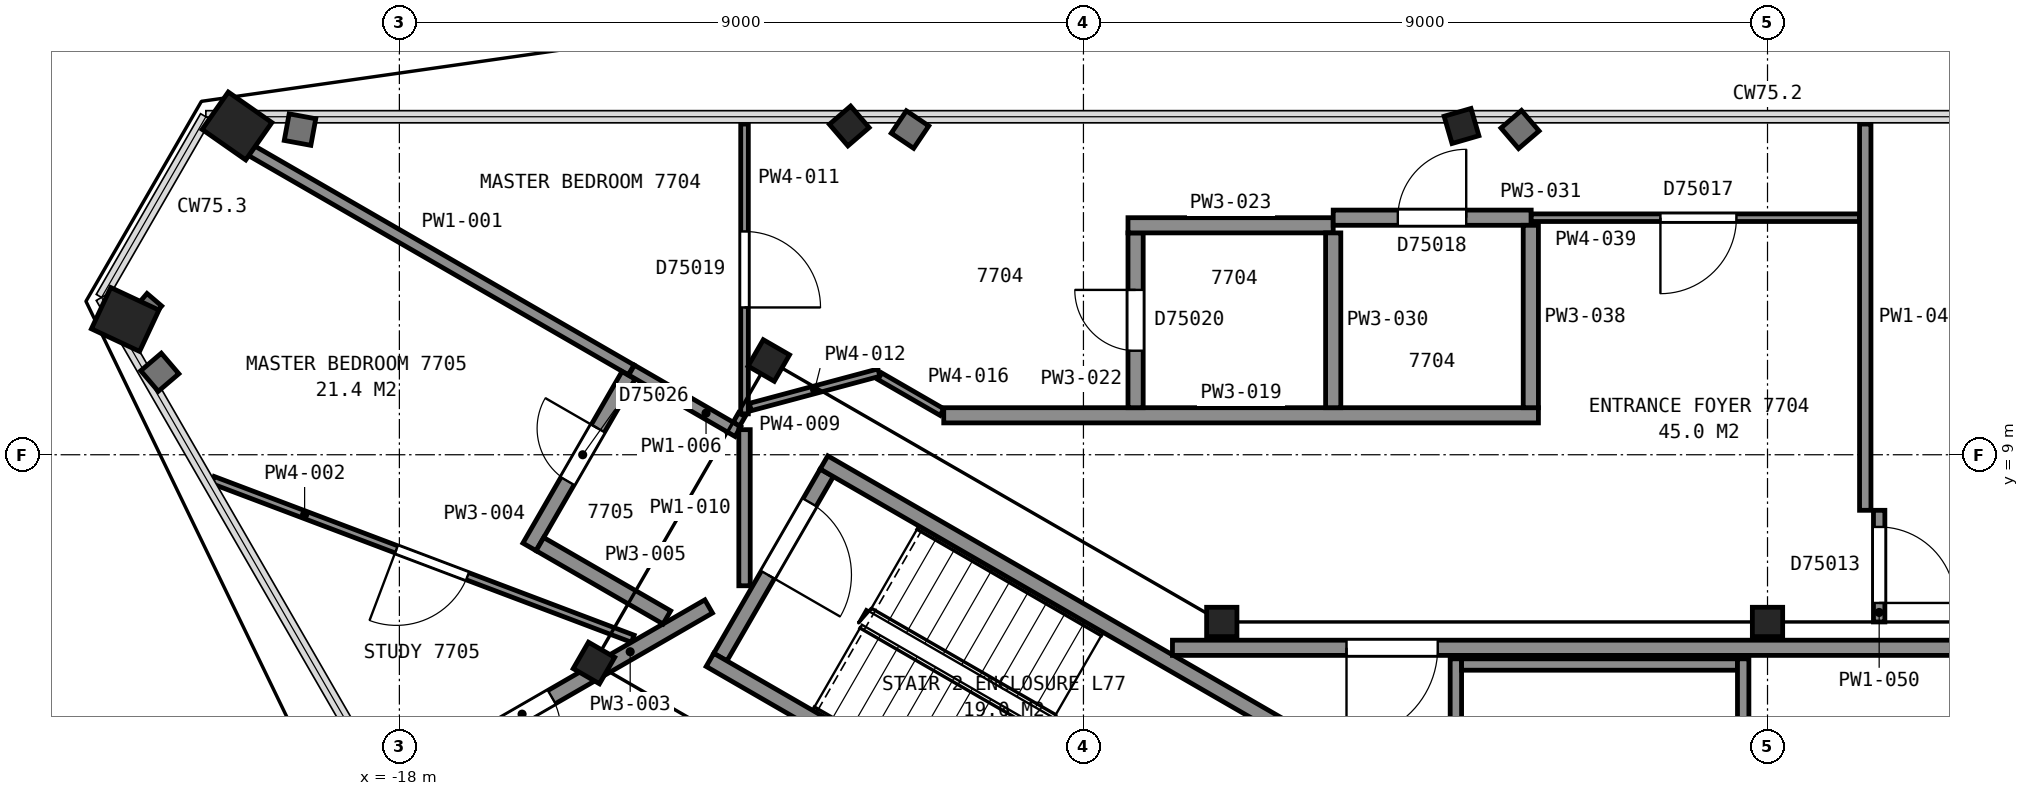
"""IFC4 building model, lengths in metres.
Left out: names, types, materials, properties, quantities, classifications, styles, units other than length and angle.
Written with IfcOpenShell. Run it as: python <this file> out.ifc"""

import sys

from ifc_helpers import new_model, si_unit, direction, frame, frame_2d, origin, origin_2d, place, context, subcontext, project, spatial, rectangle, hollow_rectangle, i_section, extrude, element, fill, save


model = new_model("IFC4")
c1 = context("Model", 3, precision=1e-05, world=origin(), true_north=direction((0.0, 1.0)))
c2 = subcontext(c1, "Body", "Model", "MODEL_VIEW")
j1 = project(units=[si_unit("LENGTHUNIT", "METRE"), si_unit("PLANEANGLEUNIT", "RADIAN")], contexts=[c1])
p1 = place(None, origin())
s1 = spatial("IfcSite", under=j1, at=p1, CompositionType="ELEMENT")
p2 = place(p1, origin())
s2 = spatial("IfcBuilding", under=s1, at=p2, CompositionType="ELEMENT")
p3 = place(p2, frame((0.0, 0.0, 304.7)))
s3 = spatial("IfcBuildingStorey", under=s2, at=p3, CompositionType="ELEMENT", Elevation=304.7)
p4 = place(p3, frame((-4.116, 13.638, 0.045), z_axis=(0.075454530978, -0.260152118886, 0.962614922383), x_axis=(0.996942757007, 3.6761517e-05, -0.078135381871)))
e1 = element("IfcColumn", 1, at=p4, inside=s3, PredefinedType="COLUMN", context=c2, shape_type="SweptSolid", body=[
    extrude(i_section(OverallWidth=0.373, OverallDepth=0.368, WebThickness=0.015, FlangeThickness=0.024, FilletRadius=0.015, at=origin_2d()), origin(), (0.0, 0.0, 1.0), 3.75),
])
p5 = place(p3, frame((-12.347, 13.635, 0.055), z_axis=(0.218944088069, -0.254559334695, 0.94194640581), x_axis=(0.974036747124, 4.8635043e-05, -0.226389957566)))
e2 = element("IfcColumn", 2, at=p5, inside=s3, PredefinedType="COLUMN", context=c2, shape_type="SweptSolid", body=[
    extrude(i_section(OverallWidth=0.373, OverallDepth=0.368, WebThickness=0.015, FlangeThickness=0.024, FilletRadius=0.015, at=origin_2d()), origin(), (0.0, 0.0, 1.0), 3.811),
])
p6 = place(p3, frame((-20.565, 13.626, 0.09), z_axis=(0.349540963312, -0.244465386581, 0.904465471829), x_axis=(0.499636006059, 0.86527489038, 0.040782662093)))
e3 = element("IfcColumn", 3, at=p6, inside=s3, PredefinedType="COLUMN", context=c2, shape_type="SweptSolid", body=[
    extrude(hollow_rectangle(XDim=0.6, YDim=0.7, WallThickness=0.04, at=origin_2d()), origin(), (0.0, 0.0, 1.0), 3.892),
])
p7 = place(p3, frame((-22.082, 11.002, 0.09), z_axis=(0.386249226446, -0.1808602436, 0.904489418045), x_axis=(0.499519388937, 0.865365975723, -0.040275403639)))
e4 = element("IfcColumn", 4, at=p7, inside=s3, PredefinedType="COLUMN", context=c2, shape_type="SweptSolid", body=[
    extrude(hollow_rectangle(XDim=0.6, YDim=0.7, WallThickness=0.04, at=origin_2d()), origin(), (0.0, 0.0, 1.0), 3.892),
])
for number, where, z_axis, x_axis in (
    (5, (0.0, 6.8, 0.0), (0.0, 0.0, 1.0), (1.0, 0.0, 0.0)),
    (6, (-7.18, 6.8, 0.0), (0.0, 0.0, 1.0), (1.0, 0.0, 0.0)),
):
    element("IfcColumn", number, at=place(p3, frame(where, z_axis=z_axis, x_axis=x_axis)), inside=s3, PredefinedType="COLUMN", context=c2, shape_type="SweptSolid", body=[
        extrude(i_section(OverallWidth=0.399, OverallDepth=0.386, WebThickness=0.021, FlangeThickness=0.033, FilletRadius=0.015, at=origin_2d()), origin(), (0.0, 0.0, 1.0), 3.7),
    ])
for number, where, z_axis, x_axis in (
    (7, (-13.14, 10.24, 0.0), (0.0, 0.0, 1.0), (0.5, 0.866, 0.0)),
    (8, (-15.44, 6.26, 0.0), (0.0, 0.0, 1.0), (0.5, 0.866, 0.0)),
):
    element("IfcColumn", number, at=place(p3, frame(where, z_axis=z_axis, x_axis=x_axis)), inside=s3, PredefinedType="COLUMN", context=c2, shape_type="SweptSolid", body=[
        extrude(i_section(OverallWidth=0.401, OverallDepth=0.399, WebThickness=0.025, FlangeThickness=0.04, FilletRadius=0.015, at=origin_2d()), origin(), (0.0, 0.0, 1.0), 3.7),
    ])
p8 = place(p3, frame((-12.377, 8.762, 0.0), z_axis=(0.0, 0.0, 1.0), x_axis=(-0.500049511043, -0.865996816683, 0.0)))
e9 = element("IfcWall", 9, at=p8, inside=s3, PredefinedType="PARTITIONING", context=c2, shape_type="SweptSolid", body=[
    extrude(rectangle(XDim=2.8, YDim=0.2, at=frame_2d((1.4, 0.0))), origin(), (0.0, 0.0, 1.0), 3.45),
])
p9 = place(p8, frame((0.45, 0.0, 0.0)))
e10 = element("IfcOpeningElement", 10, at=p9, cuts=e9, PredefinedType="OPENING", context=c2, shape_type="SweptSolid", body=[
    extrude(rectangle(XDim=1.1, YDim=2.1, at=frame_2d((0.55, 1.05))), frame((0.0, 0.11, 0.0), z_axis=(0.0, -1.0, 0.0), x_axis=(1.0, 0.0, 0.0)), (0.0, 0.0, 1.0), 0.22),
])
for number, where, z_axis, x_axis in (
    (11, (-7.678, 2.701, 0.0), (0.0, 0.0, 1.0), (-0.866, 0.5, 0.0)),
    (12, (-6.178, 5.299, 0.0), (0.0, 0.0, 1.0), (-0.866, 0.5, 0.0)),
):
    element("IfcWall", number, at=place(p3, frame(where, z_axis=z_axis, x_axis=x_axis)), inside=s3, PredefinedType="PARTITIONING", context=c2, shape_type="SweptSolid", body=[
        extrude(rectangle(XDim=7.2, YDim=0.2, at=frame_2d((3.6, 0.0))), origin(), (0.0, 0.0, 1.0), 3.45),
    ])
p10 = place(p3, frame((7.829, 6.46, 0.0), z_axis=(0.0, 0.0, 1.0), x_axis=(-1.0, 0.0, 0.0)))
e13 = element("IfcWall", 13, at=p10, inside=s3, PredefinedType="PARTITIONING", context=c2, shape_type="SweptSolid", body=[
    extrude(rectangle(XDim=15.658, YDim=0.2, at=frame_2d((7.829, 0.0))), origin(), (0.0, 0.0, 1.0), 3.45),
])
p11 = place(p10, frame((12.168, 0.0, 0.0)))
e14 = element("IfcOpeningElement", 14, at=p11, cuts=e13, PredefinedType="OPENING", context=c2, shape_type="SweptSolid", body=[
    extrude(rectangle(XDim=1.2, YDim=2.1, at=frame_2d((0.6, 1.05))), frame((0.0, 0.11, 0.0), z_axis=(0.0, -1.0, 0.0), x_axis=(1.0, 0.0, 0.0)), (0.0, 0.0, 1.0), 0.22),
])
p12 = place(p3, frame((-4.1, 2.085, 0.0), z_axis=(0.0, 0.0, 1.0), x_axis=(0.0, 1.0, 0.0)))
e15 = element("IfcWall", 15, at=p12, inside=s3, PredefinedType="PARTITIONING", context=c2, shape_type="SweptSolid", body=[
    extrude(rectangle(XDim=4.23, YDim=0.15, at=frame_2d((2.115, 0.0))), origin(), (0.0, 0.0, 1.0), 3.45),
])
p13 = place(p12, frame((1.625, 0.0, 0.0)))
e16 = element("IfcOpeningElement", 16, at=p13, cuts=e15, PredefinedType="OPENING", context=c2, shape_type="SweptSolid", body=[
    extrude(rectangle(XDim=1.0, YDim=2.1, at=frame_2d((0.5, 1.05))), frame((0.0, 0.085, 0.0), z_axis=(0.0, -1.0, 0.0), x_axis=(1.0, 0.0, 0.0)), (0.0, 0.0, 1.0), 0.17),
])
p14 = place(p3, frame((-4.025, 6.24, 0.0), z_axis=(0.0, 0.0, 1.0), x_axis=(1.0, 0.0, 0.0)))
e17 = element("IfcWall", 17, at=p14, inside=s3, PredefinedType="PARTITIONING", context=c2, shape_type="SweptSolid", body=[
    extrude(rectangle(XDim=3.63, YDim=0.15, at=frame_2d((1.815, 0.0))), origin(), (0.0, 0.0, 1.0), 3.45),
])
p15 = place(p3, frame((-0.32, 2.252, 0.0), z_axis=(0.0, 0.0, 1.0), x_axis=(0.0, 1.0, 0.0)))
e18 = element("IfcWall", 18, at=p15, inside=s3, PredefinedType="PARTITIONING", context=c2, shape_type="SweptSolid", body=[
    extrude(rectangle(XDim=4.063, YDim=0.15, at=frame_2d((2.031, 0.0))), origin(), (0.0, 0.0, 1.0), 3.45),
])
p16 = place(p3, frame((-20.506, 13.324, 0.0), z_axis=(0.0, 0.0, 1.0), x_axis=(0.866004971522, -0.500035388047, 0.0)))
e19 = element("IfcWall", 19, at=p16, inside=s3, PredefinedType="PARTITIONING", context=c2, shape_type="SweptSolid", body=[
    extrude(rectangle(XDim=6.416, YDim=0.15, at=frame_2d((3.208, 0.0))), origin(), (0.0, 0.0, 1.0), 2.723),
])
p17 = place(p3, frame((-20.454, 8.667, 0.0), z_axis=(0.0, 0.0, 1.0), x_axis=(0.935410436961, -0.353563734601, 0.0)))
e20 = element("IfcWall", 20, at=p17, inside=s3, PredefinedType="PARTITIONING", context=c2, shape_type="SweptSolid", body=[
    extrude(rectangle(XDim=5.907, YDim=0.1, at=frame_2d((2.953, 0.0))), origin(), (0.0, 0.0, 1.0), 2.723),
])
p18 = place(p17, frame((2.582, 0.0, 0.0)))
e21 = element("IfcOpeningElement", 21, at=p18, cuts=e20, PredefinedType="OPENING", context=c2, shape_type="SweptSolid", body=[
    extrude(rectangle(XDim=1.0, YDim=2.1, at=frame_2d((0.5, 1.05))), frame((0.0, 0.06, 0.0), z_axis=(0.0, -1.0, 0.0), x_axis=(1.0, 0.0, 0.0)), (0.0, 0.0, 1.0), 0.12),
])
p19 = place(p3, frame((-18.078, 4.61, 0.0), z_axis=(0.0, 0.0, 1.0), x_axis=(0.86606672372, 0.499928424942, 0.0)))
e22 = element("IfcWall", 22, at=p19, inside=s3, PredefinedType="PARTITIONING", context=c2, shape_type="SweptSolid", body=[
    extrude(rectangle(XDim=4.788, YDim=0.2, at=frame_2d((2.394, 0.0))), origin(), (0.0, 0.0, 1.0), 2.723),
])
p20 = place(p19, frame((1.504, 0.0, 0.0)))
e23 = element("IfcOpeningElement", 23, at=p20, cuts=e22, PredefinedType="OPENING", context=c2, shape_type="SweptSolid", body=[
    extrude(rectangle(XDim=0.9, YDim=2.1, at=frame_2d((0.45, 1.05))), frame((0.0, 0.11, 0.0), z_axis=(0.0, -1.0, 0.0), x_axis=(1.0, 0.0, 0.0)), (0.0, 0.0, 1.0), 0.22),
])
p21 = place(p3, frame((-14.985, 10.045, 0.0), z_axis=(0.0, 0.0, 1.0), x_axis=(-0.499917058339, -0.866073284879, 0.0)))
e24 = element("IfcWall", 24, at=p21, inside=s3, PredefinedType="PARTITIONING", context=c2, shape_type="SweptSolid", body=[
    extrude(rectangle(XDim=2.606, YDim=0.2, at=frame_2d((1.303, 0.0))), origin(), (0.0, 0.0, 1.0), 2.723),
])
p22 = place(p21, frame((0.806, 0.0, 0.0)))
e25 = element("IfcOpeningElement", 25, at=p22, cuts=e24, PredefinedType="OPENING", context=c2, shape_type="SweptSolid", body=[
    extrude(rectangle(XDim=0.8, YDim=2.1, at=frame_2d((0.4, 1.05))), frame((0.0, 0.11, 0.0), z_axis=(0.0, -1.0, 0.0), x_axis=(1.0, 0.0, 0.0)), (0.0, 0.0, 1.0), 0.22),
])
p23 = place(p3, frame((-16.151, 7.824, 0.0), z_axis=(0.0, 0.0, 1.0), x_axis=(0.86603803935, -0.499978113919, 0.0)))
e26 = element("IfcWall", 26, at=p23, inside=s3, PredefinedType="PARTITIONING", context=c2, shape_type="SweptSolid", body=[
    extrude(rectangle(XDim=1.929, YDim=0.2, at=frame_2d((0.964, 0.0))), origin(), (0.0, 0.0, 1.0), 2.723),
])
p24 = place(p3, frame((-14.945, 10.114, 0.0), z_axis=(0.0, 0.0, 1.0), x_axis=(0.865722560266, -0.500524173887, 0.0)))
e27 = element("IfcWall", 27, at=p24, inside=s3, PredefinedType="PARTITIONING", context=c2, shape_type="SweptSolid", body=[
    extrude(rectangle(XDim=1.616, YDim=0.15, at=frame_2d((0.808, 0.0))), origin(), (0.0, 0.0, 1.0), 2.723),
])
p25 = place(p3, frame((-13.565, 9.404, 0.0), z_axis=(0.0, 0.0, 1.0), x_axis=(0.500563174455, 0.865700010615, 0.0)))
e28 = element("IfcWall", 28, at=p25, inside=s3, PredefinedType="PARTITIONING", context=c2, shape_type="SweptSolid", body=[
    extrude(rectangle(XDim=0.142, YDim=0.1, at=frame_2d((0.071, 0.0))), origin(), (0.0, 0.0, 1.0), 2.723),
])
p26 = place(p3, frame((-13.459, 7.276, 0.0), z_axis=(0.0, 0.0, 1.0), x_axis=(0.0, 1.0, 0.0)))
e29 = element("IfcWall", 29, at=p26, inside=s3, PredefinedType="PARTITIONING", context=c2, shape_type="SweptSolid", body=[
    extrude(rectangle(XDim=2.054, YDim=0.15, at=frame_2d((1.027, 0.0))), origin(), (0.0, 0.0, 1.0), 2.723),
])
p27 = place(p3, frame((-13.459, 9.538, 0.0), z_axis=(0.0, 0.0, 1.0), x_axis=(0.0, 1.0, 0.0)))
e30 = element("IfcWall", 30, at=p27, inside=s3, PredefinedType="PARTITIONING", context=c2, shape_type="SweptSolid", body=[
    extrude(rectangle(XDim=3.813, YDim=0.1, at=frame_2d((1.906, 0.0))), origin(), (0.0, 0.0, 1.0), 2.723),
])
p28 = place(p27, frame((1.4, 0.0, 0.0)))
e31 = element("IfcOpeningElement", 31, at=p28, cuts=e30, PredefinedType="OPENING", context=c2, shape_type="SweptSolid", body=[
    extrude(rectangle(XDim=1.0, YDim=2.1, at=frame_2d((0.5, 1.05))), frame((0.0, 0.06, 0.0), z_axis=(0.0, -1.0, 0.0), x_axis=(1.0, 0.0, 0.0)), (0.0, 0.0, 1.0), 0.12),
])
p29 = place(p3, frame((-13.383, 9.628, 0.0), z_axis=(0.0, 0.0, 1.0), x_axis=(0.966010217228, 0.258503888194, 0.0)))
e32 = element("IfcWall", 32, at=p29, inside=s3, PredefinedType="PARTITIONING", context=c2, shape_type="SweptSolid", body=[
    extrude(rectangle(XDim=1.752, YDim=0.1, at=frame_2d((0.876, 0.0))), origin(), (0.0, 0.0, 1.0), 2.723),
])
p30 = place(p3, frame((-11.678, 10.033, 0.0), z_axis=(0.0, 0.0, 1.0), x_axis=(0.866116627388, -0.499841962787, 0.0)))
e33 = element("IfcWall", 33, at=p30, inside=s3, PredefinedType="PARTITIONING", context=c2, shape_type="SweptSolid", body=[
    extrude(rectangle(XDim=0.943, YDim=0.1, at=frame_2d((0.472, 0.0))), origin(), (0.0, 0.0, 1.0), 2.723),
])
p31 = place(p3, frame((-10.838, 9.519, 0.0), z_axis=(0.0, 0.0, 1.0), x_axis=(1.0, 0.0, 0.0)))
e34 = element("IfcWall", 34, at=p31, inside=s3, PredefinedType="PARTITIONING", context=c2, shape_type="SweptSolid", body=[
    extrude(rectangle(XDim=7.824, YDim=0.2, at=frame_2d((3.912, 0.0))), origin(), (0.0, 0.0, 1.0), 2.723),
])
p32 = place(p3, frame((-8.314, 11.919, 0.0), z_axis=(0.0, 0.0, 1.0), x_axis=(0.0, -1.0, 0.0)))
e35 = element("IfcWall", 35, at=p32, inside=s3, PredefinedType="PARTITIONING", context=c2, shape_type="SweptSolid", body=[
    extrude(rectangle(XDim=2.3, YDim=0.2, at=frame_2d((1.15, 0.0))), origin(), (0.0, 0.0, 1.0), 2.723),
])
p33 = place(p32, frame((0.75, 0.0, 0.0)))
e36 = element("IfcOpeningElement", 36, at=p33, cuts=e35, PredefinedType="OPENING", context=c2, shape_type="SweptSolid", body=[
    extrude(rectangle(XDim=0.8, YDim=2.1, at=frame_2d((0.4, 1.05))), frame((0.0, 0.11, 0.0), z_axis=(0.0, -1.0, 0.0), x_axis=(1.0, 0.0, 0.0)), (0.0, 0.0, 1.0), 0.22),
])
p34 = place(p3, frame((-8.414, 12.019, 0.0), z_axis=(0.0, 0.0, 1.0), x_axis=(1.0, 0.0, 0.0)))
e37 = element("IfcWall", 37, at=p34, inside=s3, PredefinedType="PARTITIONING", context=c2, shape_type="SweptSolid", body=[
    extrude(rectangle(XDim=2.7, YDim=0.2, at=frame_2d((1.35, 0.0))), origin(), (0.0, 0.0, 1.0), 2.723),
])
p35 = place(p3, frame((-5.714, 9.619, 0.0), z_axis=(0.0, 0.0, 1.0), x_axis=(0.0, 1.0, 0.0)))
e38 = element("IfcWall", 38, at=p35, inside=s3, PredefinedType="PARTITIONING", context=c2, shape_type="SweptSolid", body=[
    extrude(rectangle(XDim=2.3, YDim=0.2, at=frame_2d((1.15, 0.0))), origin(), (0.0, 0.0, 1.0), 2.723),
])
p36 = place(p3, frame((-3.109, 12.119, 0.0), z_axis=(0.0, 0.0, 1.0), x_axis=(-1.0, 0.0, 0.0)))
e39 = element("IfcWall", 39, at=p36, inside=s3, PredefinedType="PARTITIONING", context=c2, shape_type="SweptSolid", body=[
    extrude(rectangle(XDim=2.605, YDim=0.2, at=frame_2d((1.303, 0.0))), origin(), (0.0, 0.0, 1.0), 2.723),
])
p37 = place(p36, frame((0.855, 0.0, 0.0)))
e40 = element("IfcOpeningElement", 40, at=p37, cuts=e39, PredefinedType="OPENING", context=c2, shape_type="SweptSolid", body=[
    extrude(rectangle(XDim=0.9, YDim=2.1, at=frame_2d((0.45, 1.05))), frame((0.0, 0.11, 0.0), z_axis=(0.0, -1.0, 0.0), x_axis=(1.0, 0.0, 0.0)), (0.0, 0.0, 1.0), 0.22),
])
p38 = place(p3, frame((-3.114, 9.619, 0.0), z_axis=(0.0, 0.0, 1.0), x_axis=(0.0, 1.0, 0.0)))
e41 = element("IfcWall", 41, at=p38, inside=s3, PredefinedType="PARTITIONING", context=c2, shape_type="SweptSolid", body=[
    extrude(rectangle(XDim=2.4, YDim=0.2, at=frame_2d((1.2, 0.0))), origin(), (0.0, 0.0, 1.0), 2.723),
])
p39 = place(p3, frame((-3.109, 12.119, 0.0), z_axis=(0.0, 0.0, 1.0), x_axis=(1.0, 0.0, 0.0)))
e42 = element("IfcWall", 42, at=p39, inside=s3, PredefinedType="PARTITIONING", context=c2, shape_type="SweptSolid", body=[
    extrude(rectangle(XDim=4.32, YDim=0.1, at=frame_2d((2.16, 0.0))), origin(), (0.0, 0.0, 1.0), 2.723),
])
p40 = place(p39, frame((1.7, 0.0, 0.0)))
e43 = element("IfcOpeningElement", 43, at=p40, cuts=e42, PredefinedType="OPENING", context=c2, shape_type="SweptSolid", body=[
    extrude(rectangle(XDim=1.0, YDim=2.1, at=frame_2d((0.5, 1.05))), frame((0.0, 0.06, 0.0), z_axis=(0.0, -1.0, 0.0), x_axis=(1.0, 0.0, 0.0)), (0.0, 0.0, 1.0), 0.12),
])
p41 = place(p3, frame((1.286, 8.269, 0.0), z_axis=(0.0, 0.0, 1.0), x_axis=(0.0, 1.0, 0.0)))
e44 = element("IfcWall", 44, at=p41, inside=s3, PredefinedType="PARTITIONING", context=c2, shape_type="SweptSolid", body=[
    extrude(rectangle(XDim=5.082, YDim=0.15, at=frame_2d((2.541, 0.0))), origin(), (0.0, 0.0, 1.0), 2.723),
])
p42 = place(p3, frame((1.469, 8.269, 0.0), z_axis=(0.0, 0.0, 1.0), x_axis=(0.0, -1.0, 0.0)))
e45 = element("IfcWall", 45, at=p42, inside=s3, PredefinedType="PARTITIONING", context=c2, shape_type="SweptSolid", body=[
    extrude(rectangle(XDim=1.469, YDim=0.15, at=frame_2d((0.734, 0.0))), origin(), (0.0, 0.0, 1.0), 2.723),
])
p43 = place(p42, frame((0.219, 0.0, 0.0)))
e46 = element("IfcOpeningElement", 46, at=p43, cuts=e45, PredefinedType="OPENING", context=c2, shape_type="SweptSolid", body=[
    extrude(rectangle(XDim=1.0, YDim=2.1, at=frame_2d((0.5, 1.05))), frame((0.0, 0.085, 0.0), z_axis=(0.0, -1.0, 0.0), x_axis=(1.0, 0.0, 0.0)), (0.0, 0.0, 1.0), 0.17),
])
p44 = place(p9, origin())
e47 = element("IfcDoor", 47, at=p44, inside=s3, OperationType="SINGLE_SWING_RIGHT", PredefinedType="DOOR", context=c2, shape_type="SweptSolid", body=[
    extrude(rectangle(XDim=1.1, YDim=2.1, at=frame_2d((0.55, 1.05))), frame((0.0, 0.025, 0.0), z_axis=(0.0, -1.0, 0.0), x_axis=(1.0, 0.0, 0.0)), (0.0, 0.0, 1.0), 0.05),
])
fill(e10, e47)
p45 = place(p11, origin())
e48 = element("IfcDoor", 48, at=p45, inside=s3, OperationType="SINGLE_SWING_RIGHT", PredefinedType="DOOR", context=c2, shape_type="SweptSolid", body=[
    extrude(rectangle(XDim=1.2, YDim=2.1, at=frame_2d((0.6, 1.05))), frame((0.0, 0.025, 0.0), z_axis=(0.0, -1.0, 0.0), x_axis=(1.0, 0.0, 0.0)), (0.0, 0.0, 1.0), 0.05),
])
fill(e14, e48)
p46 = place(p18, origin())
e49 = element("IfcDoor", 49, at=p46, inside=s3, OperationType="SINGLE_SWING_LEFT", PredefinedType="DOOR", context=c2, shape_type="SweptSolid", body=[
    extrude(rectangle(XDim=1.0, YDim=2.1, at=frame_2d((0.5, 1.05))), frame((0.0, 0.025, 0.0), z_axis=(0.0, -1.0, 0.0), x_axis=(1.0, 0.0, 0.0)), (0.0, 0.0, 1.0), 0.05),
])
fill(e21, e49)
p47 = place(p20, origin())
e50 = element("IfcDoor", 50, at=p47, inside=s3, OperationType="SINGLE_SWING_LEFT", PredefinedType="DOOR", context=c2, shape_type="SweptSolid", body=[
    extrude(rectangle(XDim=0.9, YDim=2.1, at=frame_2d((0.45, 1.05))), frame((0.0, 0.025, 0.0), z_axis=(0.0, -1.0, 0.0), x_axis=(1.0, 0.0, 0.0)), (0.0, 0.0, 1.0), 0.05),
])
fill(e23, e50)
p48 = place(p22, origin())
e51 = element("IfcDoor", 51, at=p48, inside=s3, OperationType="SINGLE_SWING_LEFT", PredefinedType="DOOR", context=c2, shape_type="SweptSolid", body=[
    extrude(rectangle(XDim=0.8, YDim=2.1, at=frame_2d((0.4, 1.05))), frame((0.0, 0.025, 0.0), z_axis=(0.0, -1.0, 0.0), x_axis=(1.0, 0.0, 0.0)), (0.0, 0.0, 1.0), 0.05),
])
fill(e25, e51)
p49 = place(p28, origin())
e52 = element("IfcDoor", 52, at=p49, inside=s3, OperationType="SINGLE_SWING_LEFT", PredefinedType="DOOR", context=c2, shape_type="SweptSolid", body=[
    extrude(rectangle(XDim=1.0, YDim=2.1, at=frame_2d((0.5, 1.05))), frame((0.0, 0.025, 0.0), z_axis=(0.0, -1.0, 0.0), x_axis=(1.0, 0.0, 0.0)), (0.0, 0.0, 1.0), 0.05),
])
fill(e31, e52)
p50 = place(p33, origin())
e53 = element("IfcDoor", 53, at=p50, inside=s3, OperationType="SINGLE_SWING_LEFT", PredefinedType="DOOR", context=c2, shape_type="SweptSolid", body=[
    extrude(rectangle(XDim=0.8, YDim=2.1, at=frame_2d((0.4, 1.05))), frame((0.0, 0.025, 0.0), z_axis=(0.0, -1.0, 0.0), x_axis=(1.0, 0.0, 0.0)), (0.0, 0.0, 1.0), 0.05),
])
fill(e36, e53)
p51 = place(p37, origin())
e54 = element("IfcDoor", 54, at=p51, inside=s3, OperationType="SINGLE_SWING_LEFT", PredefinedType="DOOR", context=c2, shape_type="SweptSolid", body=[
    extrude(rectangle(XDim=0.9, YDim=2.1, at=frame_2d((0.45, 1.05))), frame((0.0, 0.025, 0.0), z_axis=(0.0, -1.0, 0.0), x_axis=(1.0, 0.0, 0.0)), (0.0, 0.0, 1.0), 0.05),
])
fill(e40, e54)
p52 = place(p40, origin())
e55 = element("IfcDoor", 55, at=p52, inside=s3, OperationType="SINGLE_SWING_LEFT", PredefinedType="DOOR", context=c2, shape_type="SweptSolid", body=[
    extrude(rectangle(XDim=1.0, YDim=2.1, at=frame_2d((0.5, 1.05))), frame((0.0, 0.025, 0.0), z_axis=(0.0, -1.0, 0.0), x_axis=(1.0, 0.0, 0.0)), (0.0, 0.0, 1.0), 0.05),
])
fill(e43, e55)
p53 = place(p43, origin())
e56 = element("IfcDoor", 56, at=p53, inside=s3, OperationType="SINGLE_SWING_RIGHT", PredefinedType="DOOR", context=c2, shape_type="SweptSolid", body=[
    extrude(rectangle(XDim=1.0, YDim=2.1, at=frame_2d((0.5, 1.05))), frame((0.0, 0.025, 0.0), z_axis=(0.0, -1.0, 0.0), x_axis=(1.0, 0.0, 0.0)), (0.0, 0.0, 1.0), 0.05),
])
fill(e46, e56)
save(model, sys.argv[1])
